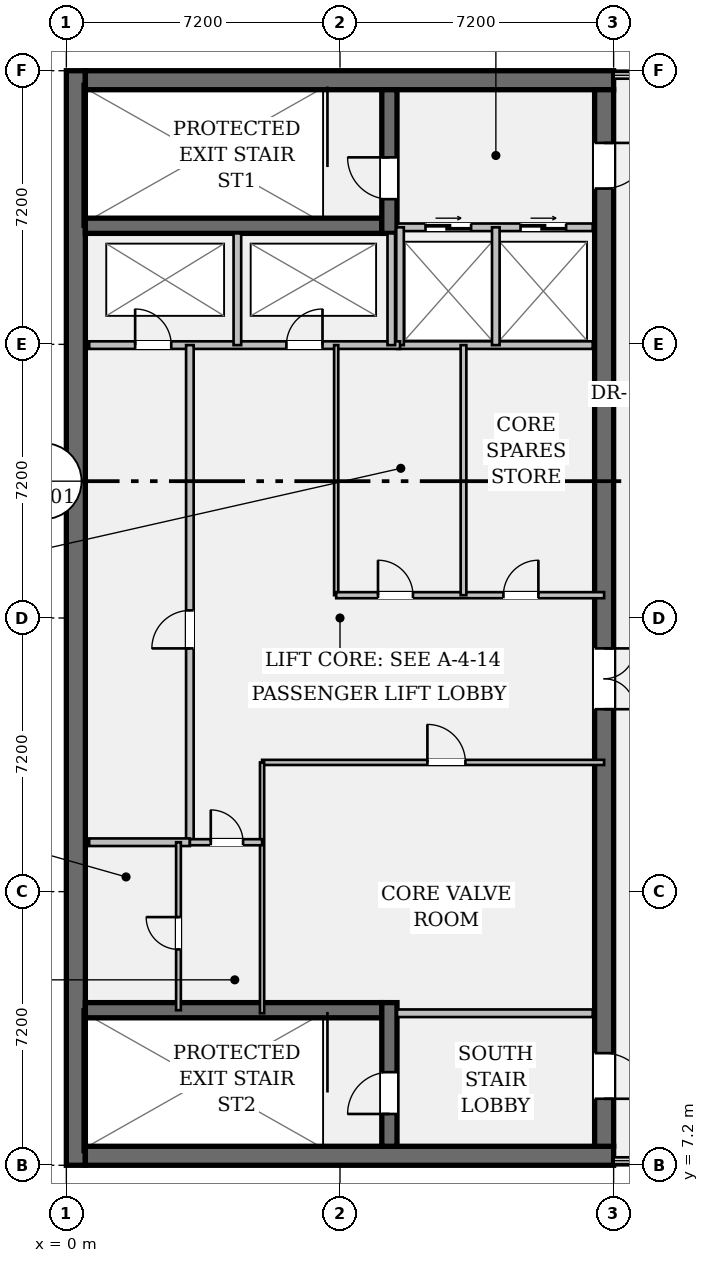
"""IFC4 building model, lengths in metres.
Left out: names, types, materials, properties, quantities, classifications, styles, units other than length and angle.
Written with IfcOpenShell. Run it as: python <this file> out.ifc"""

import sys

from ifc_helpers import new_model, si_unit, direction, frame, frame_2d, origin, place, context, subcontext, project, spatial, rectangle, extrude, element, fill, save


model = new_model("IFC4")
c1 = context("Model", 3, precision=1e-05, world=origin(), true_north=direction((0.0, 1.0)))
c2 = subcontext(c1, "Body", "Model", "MODEL_VIEW")
j1 = project(units=[si_unit("LENGTHUNIT", "METRE"), si_unit("PLANEANGLEUNIT", "RADIAN")], contexts=[c1])
p1 = place(None, origin())
s1 = spatial("IfcSite", under=j1, at=p1, CompositionType="ELEMENT")
p2 = place(p1, origin())
s2 = spatial("IfcBuilding", under=s1, at=p2, CompositionType="ELEMENT")
p3 = place(p2, frame((0.0, 0.0, 301.35)))
s3 = spatial("IfcBuildingStorey", under=s2, at=p3, CompositionType="ELEMENT", Elevation=301.35)
p4 = place(p3, frame((0.25, 7.2, 0.0), z_axis=(0.0, 0.0, 1.0), x_axis=(0.0, 1.0, 0.0)))
e1 = element("IfcWall", 1, at=p4, inside=s3, PredefinedType="SHEAR", context=c2, shape_type="SweptSolid", body=[
    extrude(rectangle(XDim=28.8, YDim=0.5, at=frame_2d((14.4, 0.0))), origin(), (0.0, 0.0, 1.0), 3.5),
])
for number, where, z_axis, x_axis in (
    (2, (0.5, 7.45, 0.0), (0.0, 0.0, 1.0), (1.0, 0.0, 0.0)),
    (3, (0.5, 35.75, 0.0), (0.0, 0.0, 1.0), (1.0, 0.0, 0.0)),
):
    element("IfcWall", number, at=place(p3, frame(where, z_axis=z_axis, x_axis=x_axis)), inside=s3, PredefinedType="SHEAR", context=c2, shape_type="SweptSolid", body=[
        extrude(rectangle(XDim=13.9, YDim=0.5, at=frame_2d((6.95, 0.0))), origin(), (0.0, 0.0, 1.0), 3.5),
    ])
p5 = place(p3, frame((14.15, 35.5, 0.0), z_axis=(0.0, 0.0, 1.0), x_axis=(0.0, -1.0, 0.0)))
e4 = element("IfcWall", 4, at=p5, inside=s3, PredefinedType="SHEAR", context=c2, shape_type="SweptSolid", body=[
    extrude(rectangle(XDim=27.8, YDim=0.5, at=frame_2d((13.9, 0.0))), origin(), (0.0, 0.0, 1.0), 3.5),
])
p6 = place(p5, frame((1.4, 0.0, 0.0)))
e5 = element("IfcOpeningElement", 5, at=p6, cuts=e4, PredefinedType="OPENING", context=c2, shape_type="SweptSolid", body=[
    extrude(rectangle(XDim=1.2, YDim=2.15, at=frame_2d((0.6, 1.075))), frame((0.0, 0.262, 0.0), z_axis=(0.0, -1.0, 0.0), x_axis=(1.0, 0.0, 0.0)), (0.0, 0.0, 1.0), 0.524),
])
p7 = place(p5, frame((25.35, 0.0, 0.0)))
e6 = element("IfcOpeningElement", 6, at=p7, cuts=e4, PredefinedType="OPENING", context=c2, shape_type="SweptSolid", body=[
    extrude(rectangle(XDim=1.2, YDim=2.15, at=frame_2d((0.6, 1.075))), frame((0.0, 0.262, 0.0), z_axis=(0.0, -1.0, 0.0), x_axis=(1.0, 0.0, 0.0)), (0.0, 0.0, 1.0), 0.524),
])
p8 = place(p5, frame((14.7, 0.0, 0.0)))
e7 = element("IfcOpeningElement", 7, at=p8, cuts=e4, PredefinedType="OPENING", context=c2, shape_type="SweptSolid", body=[
    extrude(rectangle(XDim=1.6, YDim=2.2, at=frame_2d((0.8, 1.1))), frame((0.0, 0.262, 0.0), z_axis=(0.0, -1.0, 0.0), x_axis=(1.0, 0.0, 0.0)), (0.0, 0.0, 1.0), 0.524),
])
for number, where, z_axis, x_axis in (
    (8, (0.5, 31.92, 0.0), (0.0, 0.0, 1.0), (1.0, 0.0, 0.0)),
    (9, (0.5, 11.28, 0.0), (0.0, 0.0, 1.0), (1.0, 0.0, 0.0)),
):
    element("IfcWall", number, at=place(p3, frame(where, z_axis=z_axis, x_axis=x_axis)), inside=s3, PredefinedType="SHEAR", context=c2, shape_type="SweptSolid", body=[
        extrude(rectangle(XDim=7.8, YDim=0.4, at=frame_2d((3.9, 0.0))), origin(), (0.0, 0.0, 1.0), 3.5),
    ])
p9 = place(p3, frame((8.5, 31.72, 0.0), z_axis=(0.0, 0.0, 1.0), x_axis=(0.0, 1.0, 0.0)))
e10 = element("IfcWall", 10, at=p9, inside=s3, PredefinedType="SHEAR", context=c2, shape_type="SweptSolid", body=[
    extrude(rectangle(XDim=3.78, YDim=0.4, at=frame_2d((1.89, 0.0))), origin(), (0.0, 0.0, 1.0), 3.5),
])
p10 = place(p9, frame((0.9, 0.0, 0.0)))
e11 = element("IfcOpeningElement", 11, at=p10, cuts=e10, PredefinedType="OPENING", context=c2, shape_type="SweptSolid", body=[
    extrude(rectangle(XDim=1.1, YDim=2.15, at=frame_2d((0.55, 1.075))), frame((0.0, 0.212, 0.0), z_axis=(0.0, -1.0, 0.0), x_axis=(1.0, 0.0, 0.0)), (0.0, 0.0, 1.0), 0.424),
])
p11 = place(p3, frame((8.5, 7.7, 0.0), z_axis=(0.0, 0.0, 1.0), x_axis=(0.0, 1.0, 0.0)))
e12 = element("IfcWall", 12, at=p11, inside=s3, PredefinedType="SHEAR", context=c2, shape_type="SweptSolid", body=[
    extrude(rectangle(XDim=3.78, YDim=0.4, at=frame_2d((1.89, 0.0))), origin(), (0.0, 0.0, 1.0), 3.5),
])
p12 = place(p11, frame((0.85, 0.0, 0.0)))
e13 = element("IfcOpeningElement", 13, at=p12, cuts=e12, PredefinedType="OPENING", context=c2, shape_type="SweptSolid", body=[
    extrude(rectangle(XDim=1.1, YDim=2.15, at=frame_2d((0.55, 1.075))), frame((0.0, 0.212, 0.0), z_axis=(0.0, -1.0, 0.0), x_axis=(1.0, 0.0, 0.0)), (0.0, 0.0, 1.0), 0.424),
])
p13 = place(p3, frame((8.7, 31.88, 0.0), z_axis=(0.0, 0.0, 1.0), x_axis=(1.0, 0.0, 0.0)))
e14 = element("IfcWall", 14, at=p13, inside=s3, PredefinedType="PARTITIONING", context=c2, shape_type="SweptSolid", body=[
    extrude(rectangle(XDim=5.15, YDim=0.2, at=frame_2d((2.575, 0.0))), origin(), (0.0, 0.0, 1.0), 3.5),
])
p14 = place(p13, frame((0.75, 0.0, 0.0)))
e15 = element("IfcOpeningElement", 15, at=p14, cuts=e14, PredefinedType="OPENING", context=c2, shape_type="SweptSolid", body=[
    extrude(rectangle(XDim=1.2, YDim=2.2, at=frame_2d((0.6, 1.1))), frame((0.0, 0.112, 0.0), z_axis=(0.0, -1.0, 0.0), x_axis=(1.0, 0.0, 0.0)), (0.0, 0.0, 1.0), 0.224),
])
p15 = place(p13, frame((3.25, 0.0, 0.0)))
e16 = element("IfcOpeningElement", 16, at=p15, cuts=e14, PredefinedType="OPENING", context=c2, shape_type="SweptSolid", body=[
    extrude(rectangle(XDim=1.2, YDim=2.2, at=frame_2d((0.6, 1.1))), frame((0.0, 0.112, 0.0), z_axis=(0.0, -1.0, 0.0), x_axis=(1.0, 0.0, 0.0)), (0.0, 0.0, 1.0), 0.224),
])
for number, where, z_axis, x_axis in (
    (17, (8.7, 11.2, 0.0), (0.0, 0.0, 1.0), (1.0, 0.0, 0.0)),
    (18, (8.7, 28.78, 0.0), (0.0, 0.0, 1.0), (1.0, 0.0, 0.0)),
):
    element("IfcWall", number, at=place(p3, frame(where, z_axis=z_axis, x_axis=x_axis)), inside=s3, PredefinedType="PARTITIONING", context=c2, shape_type="SweptSolid", body=[
        extrude(rectangle(XDim=5.15, YDim=0.2, at=frame_2d((2.575, 0.0))), origin(), (0.0, 0.0, 1.0), 3.5),
    ])
for number, where, z_axis, x_axis in (
    (19, (8.78, 28.78, 0.0), (0.0, 0.0, 1.0), (0.0, 1.0, 0.0)),
    (20, (11.3, 28.78, 0.0), (0.0, 0.0, 1.0), (0.0, 1.0, 0.0)),
):
    element("IfcWall", number, at=place(p3, frame(where, z_axis=z_axis, x_axis=x_axis)), inside=s3, PredefinedType="PARTITIONING", context=c2, shape_type="SweptSolid", body=[
        extrude(rectangle(XDim=3.1, YDim=0.2, at=frame_2d((1.55, 0.0))), origin(), (0.0, 0.0, 1.0), 3.5),
    ])
p16 = place(p3, frame((0.6, 28.78, 0.0), z_axis=(0.0, 0.0, 1.0), x_axis=(1.0, 0.0, 0.0)))
e21 = element("IfcWall", 21, at=p16, inside=s3, PredefinedType="PARTITIONING", context=c2, shape_type="SweptSolid", body=[
    extrude(rectangle(XDim=8.18, YDim=0.2, at=frame_2d((4.09, 0.0))), origin(), (0.0, 0.0, 1.0), 3.5),
])
p17 = place(p16, frame((1.21, 0.0, 0.0)))
e22 = element("IfcOpeningElement", 22, at=p17, cuts=e21, PredefinedType="OPENING", context=c2, shape_type="SweptSolid", body=[
    extrude(rectangle(XDim=0.95, YDim=2.15, at=frame_2d((0.475, 1.075))), frame((0.0, 0.112, 0.0), z_axis=(0.0, -1.0, 0.0), x_axis=(1.0, 0.0, 0.0)), (0.0, 0.0, 1.0), 0.224),
])
p18 = place(p16, frame((5.19, 0.0, 0.0)))
e23 = element("IfcOpeningElement", 23, at=p18, cuts=e21, PredefinedType="OPENING", context=c2, shape_type="SweptSolid", body=[
    extrude(rectangle(XDim=0.95, YDim=2.15, at=frame_2d((0.475, 1.075))), frame((0.0, 0.112, 0.0), z_axis=(0.0, -1.0, 0.0), x_axis=(1.0, 0.0, 0.0)), (0.0, 0.0, 1.0), 0.224),
])
for number, where, z_axis, x_axis in (
    (24, (4.5, 28.78, 0.0), (0.0, 0.0, 1.0), (0.0, 1.0, 0.0)),
    (25, (8.55, 28.78, 0.0), (0.0, 0.0, 1.0), (0.0, 1.0, 0.0)),
):
    element("IfcWall", number, at=place(p3, frame(where, z_axis=z_axis, x_axis=x_axis)), inside=s3, PredefinedType="PARTITIONING", context=c2, shape_type="SweptSolid", body=[
        extrude(rectangle(XDim=2.94, YDim=0.2, at=frame_2d((1.47, 0.0))), origin(), (0.0, 0.0, 1.0), 3.5),
    ])
p19 = place(p3, frame((3.25, 15.7, 0.0), z_axis=(0.0, 0.0, 1.0), x_axis=(0.0, 1.0, 0.0)))
e26 = element("IfcWall", 26, at=p19, inside=s3, PredefinedType="PARTITIONING", context=c2, shape_type="SweptSolid", body=[
    extrude(rectangle(XDim=13.08, YDim=0.2, at=frame_2d((6.54, 0.0))), origin(), (0.0, 0.0, 1.0), 2.347),
])
p20 = place(p19, frame((5.1, 0.0, 0.0)))
e27 = element("IfcOpeningElement", 27, at=p20, cuts=e26, PredefinedType="OPENING", context=c2, shape_type="SweptSolid", body=[
    extrude(rectangle(XDim=1.0, YDim=2.15, at=frame_2d((0.5, 1.075))), frame((0.0, 0.112, 0.0), z_axis=(0.0, -1.0, 0.0), x_axis=(1.0, 0.0, 0.0)), (0.0, 0.0, 1.0), 0.224),
])
p21 = place(p3, frame((0.6, 15.7, 0.0), z_axis=(0.0, 0.0, 1.0), x_axis=(1.0, 0.0, 0.0)))
e28 = element("IfcWall", 28, at=p21, inside=s3, PredefinedType="PARTITIONING", context=c2, shape_type="SweptSolid", body=[
    extrude(rectangle(XDim=2.65, YDim=0.2, at=frame_2d((1.325, 0.0))), origin(), (0.0, 0.0, 1.0), 3.5),
])
p22 = place(p3, frame((7.1, 22.2, 0.0), z_axis=(0.0, 0.0, 1.0), x_axis=(0.0, 1.0, 0.0)))
e29 = element("IfcWall", 29, at=p22, inside=s3, PredefinedType="PARTITIONING", context=c2, shape_type="SweptSolid", body=[
    extrude(rectangle(XDim=6.58, YDim=0.11, at=frame_2d((3.29, 0.0))), origin(), (0.0, 0.0, 1.0), 2.347),
])
p23 = place(p3, frame((7.1, 22.2, 0.0), z_axis=(0.0, 0.0, 1.0), x_axis=(1.0, 0.0, 0.0)))
e30 = element("IfcWall", 30, at=p23, inside=s3, PredefinedType="PARTITIONING", context=c2, shape_type="SweptSolid", body=[
    extrude(rectangle(XDim=7.05, YDim=0.16, at=frame_2d((3.525, 0.0))), origin(), (0.0, 0.0, 1.0), 3.5),
])
p24 = place(p23, frame((1.1, 0.0, 0.0)))
e31 = element("IfcOpeningElement", 31, at=p24, cuts=e30, PredefinedType="OPENING", context=c2, shape_type="SweptSolid", body=[
    extrude(rectangle(XDim=0.92, YDim=2.15, at=frame_2d((0.46, 1.075))), frame((0.0, 0.092, 0.0), z_axis=(0.0, -1.0, 0.0), x_axis=(1.0, 0.0, 0.0)), (0.0, 0.0, 1.0), 0.184),
])
p25 = place(p23, frame((4.4, 0.0, 0.0)))
e32 = element("IfcOpeningElement", 32, at=p25, cuts=e30, PredefinedType="OPENING", context=c2, shape_type="SweptSolid", body=[
    extrude(rectangle(XDim=0.92, YDim=2.15, at=frame_2d((0.46, 1.075))), frame((0.0, 0.092, 0.0), z_axis=(0.0, -1.0, 0.0), x_axis=(1.0, 0.0, 0.0)), (0.0, 0.0, 1.0), 0.184),
])
p26 = place(p3, frame((10.45, 22.2, 0.0), z_axis=(0.0, 0.0, 1.0), x_axis=(0.0, 1.0, 0.0)))
e33 = element("IfcWall", 33, at=p26, inside=s3, PredefinedType="PARTITIONING", context=c2, shape_type="SweptSolid", body=[
    extrude(rectangle(XDim=6.58, YDim=0.15, at=frame_2d((3.29, 0.0))), origin(), (0.0, 0.0, 1.0), 2.347),
])
p27 = place(p3, frame((5.15, 17.8, 0.0), z_axis=(0.0, 0.0, 1.0), x_axis=(1.0, 0.0, 0.0)))
e34 = element("IfcWall", 34, at=p27, inside=s3, PredefinedType="PARTITIONING", context=c2, shape_type="SweptSolid", body=[
    extrude(rectangle(XDim=9.0, YDim=0.135, at=frame_2d((4.5, 0.0))), origin(), (0.0, 0.0, 1.0), 3.5),
])
p28 = place(p27, frame((4.35, 0.0, 0.0)))
e35 = element("IfcOpeningElement", 35, at=p28, cuts=e34, PredefinedType="OPENING", context=c2, shape_type="SweptSolid", body=[
    extrude(rectangle(XDim=1.0, YDim=2.15, at=frame_2d((0.5, 1.075))), frame((0.0, 0.08, 0.0), z_axis=(0.0, -1.0, 0.0), x_axis=(1.0, 0.0, 0.0)), (0.0, 0.0, 1.0), 0.159),
])
p29 = place(p3, frame((5.15, 11.2, 0.0), z_axis=(0.0, 0.0, 1.0), x_axis=(0.0, 1.0, 0.0)))
e36 = element("IfcWall", 36, at=p29, inside=s3, PredefinedType="PARTITIONING", context=c2, shape_type="SweptSolid", body=[
    extrude(rectangle(XDim=6.6, YDim=0.11, at=frame_2d((3.3, 0.0))), origin(), (0.0, 0.0, 1.0), 3.5),
])
p30 = place(p3, frame((3.25, 15.7, 0.0), z_axis=(0.0, 0.0, 1.0), x_axis=(1.0, 0.0, 0.0)))
e37 = element("IfcWall", 37, at=p30, inside=s3, PredefinedType="PARTITIONING", context=c2, shape_type="SweptSolid", body=[
    extrude(rectangle(XDim=1.9, YDim=0.16, at=frame_2d((0.95, 0.0))), origin(), (0.0, 0.0, 1.0), 3.5),
])
p31 = place(p30, frame((0.55, 0.0, 0.0)))
e38 = element("IfcOpeningElement", 38, at=p31, cuts=e37, PredefinedType="OPENING", context=c2, shape_type="SweptSolid", body=[
    extrude(rectangle(XDim=0.85, YDim=2.15, at=frame_2d((0.425, 1.075))), frame((0.0, 0.092, 0.0), z_axis=(0.0, -1.0, 0.0), x_axis=(1.0, 0.0, 0.0)), (0.0, 0.0, 1.0), 0.184),
])
p32 = place(p3, frame((2.95, 11.28, 0.0), z_axis=(0.0, 0.0, 1.0), x_axis=(0.0, 1.0, 0.0)))
e39 = element("IfcWall", 39, at=p32, inside=s3, PredefinedType="PARTITIONING", context=c2, shape_type="SweptSolid", body=[
    extrude(rectangle(XDim=4.42, YDim=0.125, at=frame_2d((2.21, 0.0))), origin(), (0.0, 0.0, 1.0), 3.5),
])
p33 = place(p32, frame((1.6, 0.0, 0.0)))
e40 = element("IfcOpeningElement", 40, at=p33, cuts=e39, PredefinedType="OPENING", context=c2, shape_type="SweptSolid", body=[
    extrude(rectangle(XDim=0.85, YDim=2.15, at=frame_2d((0.425, 1.075))), frame((0.0, 0.074, 0.0), z_axis=(0.0, -1.0, 0.0), x_axis=(1.0, 0.0, 0.0)), (0.0, 0.0, 1.0), 0.149),
])
p34 = place(p10, origin())
e41 = element("IfcDoor", 41, at=p34, inside=s3, OperationType="SINGLE_SWING_RIGHT", PredefinedType="DOOR", context=c2, shape_type="SweptSolid", body=[
    extrude(rectangle(XDim=1.1, YDim=2.15, at=frame_2d((0.55, 1.075))), frame((0.0, 0.025, 0.0), z_axis=(0.0, -1.0, 0.0), x_axis=(1.0, 0.0, 0.0)), (0.0, 0.0, 1.0), 0.05),
])
fill(e11, e41)
p35 = place(p6, origin())
e42 = element("IfcDoor", 42, at=p35, inside=s3, OperationType="SINGLE_SWING_LEFT", PredefinedType="DOOR", context=c2, shape_type="SweptSolid", body=[
    extrude(rectangle(XDim=1.2, YDim=2.15, at=frame_2d((0.6, 1.075))), frame((0.0, 0.025, 0.0), z_axis=(0.0, -1.0, 0.0), x_axis=(1.0, 0.0, 0.0)), (0.0, 0.0, 1.0), 0.05),
])
fill(e5, e42)
p36 = place(p12, origin())
e43 = element("IfcDoor", 43, at=p36, inside=s3, OperationType="SINGLE_SWING_LEFT", PredefinedType="DOOR", context=c2, shape_type="SweptSolid", body=[
    extrude(rectangle(XDim=1.1, YDim=2.15, at=frame_2d((0.55, 1.075))), frame((0.0, 0.025, 0.0), z_axis=(0.0, -1.0, 0.0), x_axis=(1.0, 0.0, 0.0)), (0.0, 0.0, 1.0), 0.05),
])
fill(e13, e43)
p37 = place(p7, origin())
e44 = element("IfcDoor", 44, at=p37, inside=s3, OperationType="SINGLE_SWING_RIGHT", PredefinedType="DOOR", context=c2, shape_type="SweptSolid", body=[
    extrude(rectangle(XDim=1.2, YDim=2.15, at=frame_2d((0.6, 1.075))), frame((0.0, 0.025, 0.0), z_axis=(0.0, -1.0, 0.0), x_axis=(1.0, 0.0, 0.0)), (0.0, 0.0, 1.0), 0.05),
])
fill(e6, e44)
p38 = place(p14, origin())
e45 = element("IfcDoor", 45, at=p38, inside=s3, OperationType="DOUBLE_DOOR_SLIDING", PredefinedType="DOOR", context=c2, shape_type="SweptSolid", body=[
    extrude(rectangle(XDim=1.2, YDim=2.2, at=frame_2d((0.6, 1.1))), frame((0.0, 0.025, 0.0), z_axis=(0.0, -1.0, 0.0), x_axis=(1.0, 0.0, 0.0)), (0.0, 0.0, 1.0), 0.05),
])
fill(e15, e45)
p39 = place(p15, origin())
e46 = element("IfcDoor", 46, at=p39, inside=s3, OperationType="DOUBLE_DOOR_SLIDING", PredefinedType="DOOR", context=c2, shape_type="SweptSolid", body=[
    extrude(rectangle(XDim=1.2, YDim=2.2, at=frame_2d((0.6, 1.1))), frame((0.0, 0.025, 0.0), z_axis=(0.0, -1.0, 0.0), x_axis=(1.0, 0.0, 0.0)), (0.0, 0.0, 1.0), 0.05),
])
fill(e16, e46)
p40 = place(p17, origin())
e47 = element("IfcDoor", 47, at=p40, inside=s3, OperationType="SINGLE_SWING_LEFT", PredefinedType="DOOR", context=c2, shape_type="SweptSolid", body=[
    extrude(rectangle(XDim=0.95, YDim=2.15, at=frame_2d((0.475, 1.075))), frame((0.0, 0.025, 0.0), z_axis=(0.0, -1.0, 0.0), x_axis=(1.0, 0.0, 0.0)), (0.0, 0.0, 1.0), 0.05),
])
fill(e22, e47)
p41 = place(p18, origin())
e48 = element("IfcDoor", 48, at=p41, inside=s3, OperationType="SINGLE_SWING_RIGHT", PredefinedType="DOOR", context=c2, shape_type="SweptSolid", body=[
    extrude(rectangle(XDim=0.95, YDim=2.15, at=frame_2d((0.475, 1.075))), frame((0.0, 0.025, 0.0), z_axis=(0.0, -1.0, 0.0), x_axis=(1.0, 0.0, 0.0)), (0.0, 0.0, 1.0), 0.05),
])
fill(e23, e48)
p42 = place(p8, origin())
e49 = element("IfcDoor", 49, at=p42, inside=s3, OperationType="DOUBLE_DOOR_SINGLE_SWING", PredefinedType="DOOR", context=c2, shape_type="SweptSolid", body=[
    extrude(rectangle(XDim=1.6, YDim=2.2, at=frame_2d((0.8, 1.1))), frame((0.0, 0.025, 0.0), z_axis=(0.0, -1.0, 0.0), x_axis=(1.0, 0.0, 0.0)), (0.0, 0.0, 1.0), 0.05),
])
fill(e7, e49)
p43 = place(p20, origin())
e50 = element("IfcDoor", 50, at=p43, inside=s3, OperationType="SINGLE_SWING_LEFT", PredefinedType="DOOR", context=c2, shape_type="SweptSolid", body=[
    extrude(rectangle(XDim=1.0, YDim=2.15, at=frame_2d((0.5, 1.075))), frame((0.0, 0.025, 0.0), z_axis=(0.0, -1.0, 0.0), x_axis=(1.0, 0.0, 0.0)), (0.0, 0.0, 1.0), 0.05),
])
fill(e27, e50)
p44 = place(p24, origin())
e51 = element("IfcDoor", 51, at=p44, inside=s3, OperationType="SINGLE_SWING_LEFT", PredefinedType="DOOR", context=c2, shape_type="SweptSolid", body=[
    extrude(rectangle(XDim=0.92, YDim=2.15, at=frame_2d((0.46, 1.075))), frame((0.0, 0.025, 0.0), z_axis=(0.0, -1.0, 0.0), x_axis=(1.0, 0.0, 0.0)), (0.0, 0.0, 1.0), 0.05),
])
fill(e31, e51)
p45 = place(p25, origin())
e52 = element("IfcDoor", 52, at=p45, inside=s3, OperationType="SINGLE_SWING_RIGHT", PredefinedType="DOOR", context=c2, shape_type="SweptSolid", body=[
    extrude(rectangle(XDim=0.92, YDim=2.15, at=frame_2d((0.46, 1.075))), frame((0.0, 0.025, 0.0), z_axis=(0.0, -1.0, 0.0), x_axis=(1.0, 0.0, 0.0)), (0.0, 0.0, 1.0), 0.05),
])
fill(e32, e52)
p46 = place(p28, origin())
e53 = element("IfcDoor", 53, at=p46, inside=s3, OperationType="SINGLE_SWING_LEFT", PredefinedType="DOOR", context=c2, shape_type="SweptSolid", body=[
    extrude(rectangle(XDim=1.0, YDim=2.15, at=frame_2d((0.5, 1.075))), frame((0.0, 0.025, 0.0), z_axis=(0.0, -1.0, 0.0), x_axis=(1.0, 0.0, 0.0)), (0.0, 0.0, 1.0), 0.05),
])
fill(e35, e53)
p47 = place(p31, origin())
e54 = element("IfcDoor", 54, at=p47, inside=s3, OperationType="SINGLE_SWING_LEFT", PredefinedType="DOOR", context=c2, shape_type="SweptSolid", body=[
    extrude(rectangle(XDim=0.85, YDim=2.15, at=frame_2d((0.425, 1.075))), frame((0.0, 0.025, 0.0), z_axis=(0.0, -1.0, 0.0), x_axis=(1.0, 0.0, 0.0)), (0.0, 0.0, 1.0), 0.05),
])
fill(e38, e54)
p48 = place(p33, origin())
e55 = element("IfcDoor", 55, at=p48, inside=s3, OperationType="SINGLE_SWING_RIGHT", PredefinedType="DOOR", context=c2, shape_type="SweptSolid", body=[
    extrude(rectangle(XDim=0.85, YDim=2.15, at=frame_2d((0.425, 1.075))), frame((0.0, 0.025, 0.0), z_axis=(0.0, -1.0, 0.0), x_axis=(1.0, 0.0, 0.0)), (0.0, 0.0, 1.0), 0.05),
])
fill(e40, e55)
save(model, sys.argv[1])
